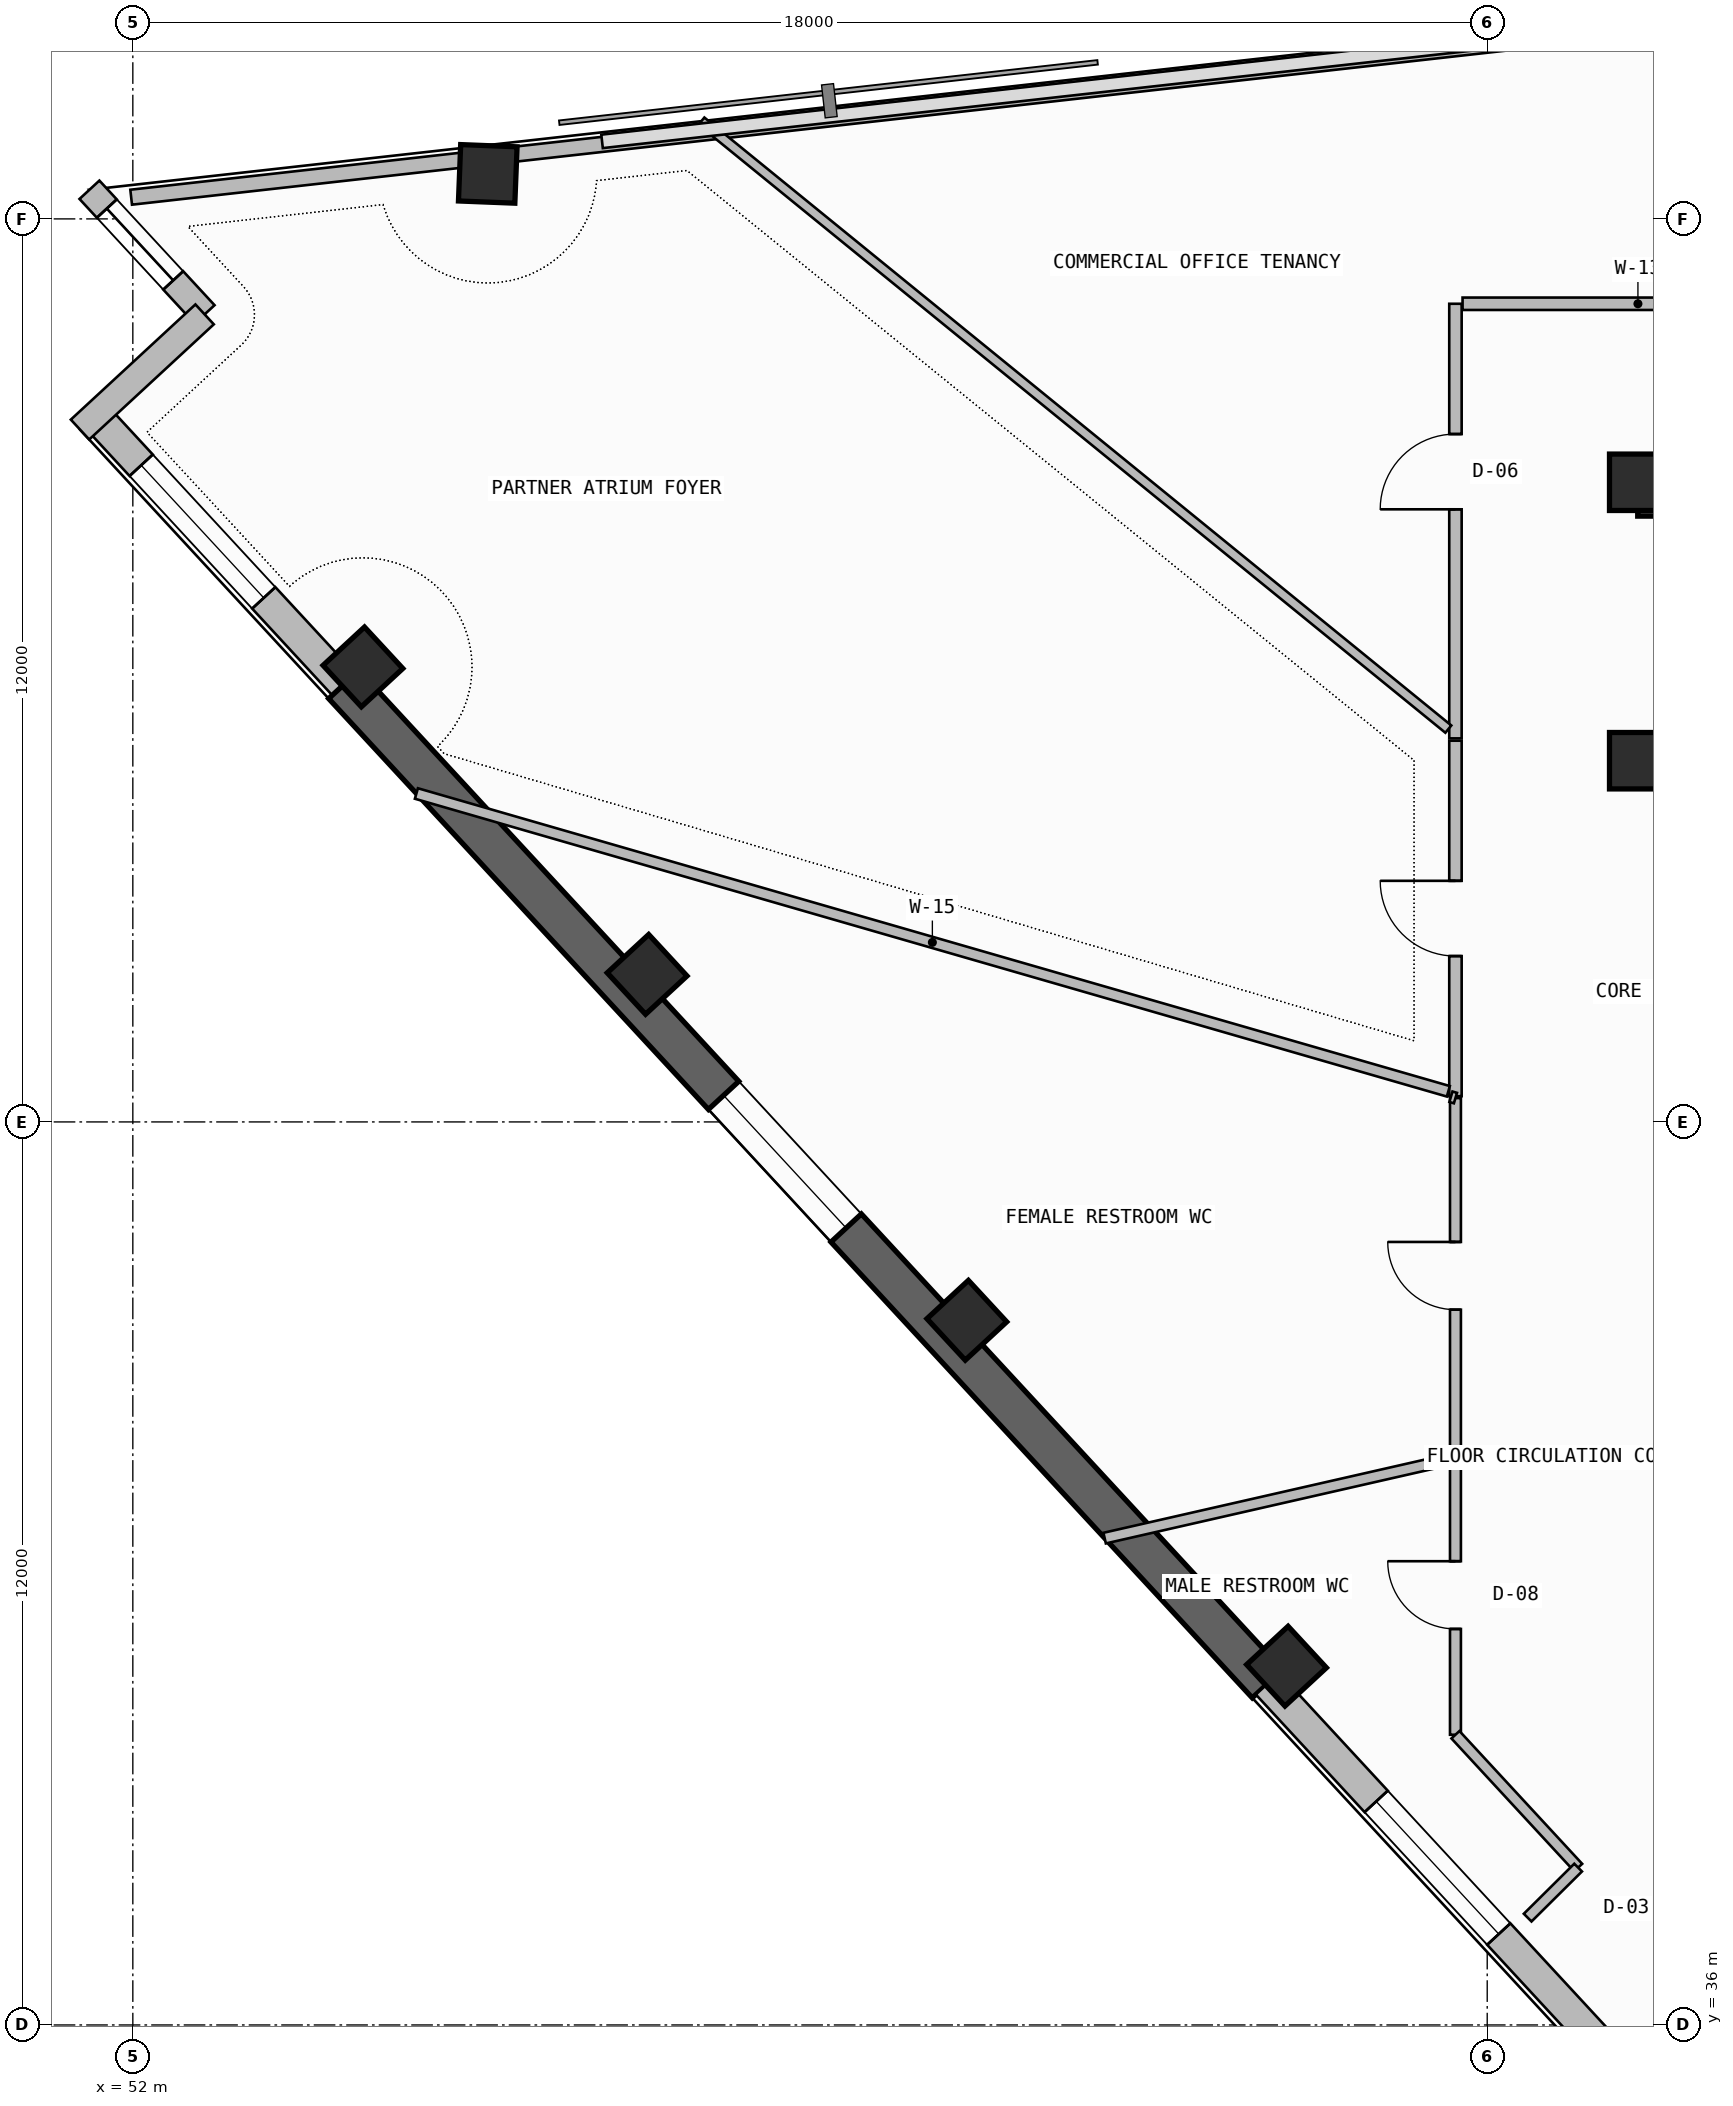
"""IFC4 building model, lengths in metres.
Left out: names, types, materials, properties, quantities, classifications, styles, units other than length and angle.
Written with IfcOpenShell. Run it as: python <this file> out.ifc"""

import sys

from ifc_helpers import new_model, si_unit, direction, frame, frame_2d, origin, origin_2d, place, context, subcontext, project, spatial, rectangle, extrude, element, fill, save


model = new_model("IFC4")
c1 = context("Model", 3, precision=1e-05, world=origin(), true_north=direction((0.0, 1.0)))
c2 = subcontext(c1, "Body", "Model", "MODEL_VIEW")
j1 = project(units=[si_unit("LENGTHUNIT", "METRE"), si_unit("PLANEANGLEUNIT", "RADIAN")], contexts=[c1])
p1 = place(None, origin())
s1 = spatial("IfcSite", under=j1, at=p1, CompositionType="ELEMENT")
p2 = place(p1, origin())
s2 = spatial("IfcBuilding", under=s1, at=p2, CompositionType="ELEMENT")
p3 = place(p2, frame((0.0, 0.0, 281.86)))
s3 = spatial("IfcBuildingStorey", under=s2, at=p3, CompositionType="ELEMENT", Elevation=281.86)
p4 = place(p3, frame((72.0, 56.35, -0.26), z_axis=(0.0, 0.0, 1.0), x_axis=(1.0, 0.0, 0.0)))
e1 = element("IfcWall", 1, at=p4, inside=s3, PredefinedType="SHEAR", context=c2, shape_type="SweptSolid", body=[
    extrude(rectangle(XDim=13.6, YDim=0.6, at=frame_2d((6.8, 0.0))), origin(), (0.0, 0.0, 1.0), 3.52),
])
for number, where, z_axis, x_axis in (
    (2, (72.0, 52.8, 0.0), (0.0, 0.0, 1.0), (1.0, 0.0, 0.0)),
    (3, (72.0, 56.5, 0.0), (0.0, 0.0, 1.0), (1.0, 0.0, 0.0)),
    (4, (56.717, 60.598, 0.0), (0.0, 0.0, 1.0), (0.039, 0.999, 0.0)),
    (5, (55.058, 54.046, 0.0), (0.0, 0.0, 1.0), (-0.679, 0.734, 0.0)),
    (6, (58.835, 49.961, 0.0), (0.0, 0.0, 1.0), (-0.679, 0.734, 0.0)),
    (7, (63.084, 45.364, 0.0), (0.0, 0.0, 1.0), (-0.679, 0.734, 0.0)),
    (8, (67.333, 40.768, 0.0), (0.0, 0.0, 1.0), (-0.679, 0.734, 0.0)),
):
    element("IfcColumn", number, at=place(p3, frame(where, z_axis=z_axis, x_axis=x_axis)), inside=s3, PredefinedType="COLUMN", context=c2, shape_type="SweptSolid", body=[
        extrude(rectangle(XDim=0.75, YDim=0.75, at=origin_2d()), origin(), (0.0, 0.0, 1.0), 3.52),
    ])
p5 = place(p3, frame((51.5, 57.387, 0.0), z_axis=(0.0, 0.0, 1.0), x_axis=(0.67880684669, -0.734316869537, 0.0)))
e9 = element("IfcWall", 9, at=p5, inside=s3, PredefinedType="SOLIDWALL", context=c2, shape_type="SweptSolid", body=[
    extrude(rectangle(XDim=4.869, YDim=0.42, at=frame_2d((2.434, 0.0))), origin(), (0.0, 0.0, 1.0), 2.645),
])
p6 = place(p5, frame((0.9, 0.0, 1.1)))
e10 = element("IfcOpeningElement", 10, at=p6, cuts=e9, PredefinedType="OPENING", context=c2, shape_type="SweptSolid", body=[
    extrude(rectangle(XDim=2.4, YDim=1.2, at=frame_2d((1.2, 0.6))), frame((0.0, 0.22, 0.0), z_axis=(0.0, -1.0, 0.0), x_axis=(1.0, 0.0, 0.0)), (0.0, 0.0, 1.0), 0.44),
])
p7 = place(p3, frame((54.805, 53.812, -0.26), z_axis=(0.0, 0.0, 1.0), x_axis=(0.678803115619, -0.734320318543, 0.0)))
e11 = element("IfcWall", 11, at=p7, inside=s3, PredefinedType="SHEAR", context=c2, shape_type="SweptSolid", body=[
    extrude(rectangle(XDim=18.083, YDim=0.55, at=frame_2d((9.042, 0.0))), origin(), (0.0, 0.0, 1.0), 3.52),
])
p8 = place(p7, frame((7.434, 0.0, 1.1)))
e12 = element("IfcOpeningElement", 12, at=p8, cuts=e11, PredefinedType="OPENING", context=c2, shape_type="SweptSolid", body=[
    extrude(rectangle(XDim=2.4, YDim=1.2, at=frame_2d((1.2, 0.6))), frame((0.0, 0.285, 0.0), z_axis=(0.0, -1.0, 0.0), x_axis=(1.0, 0.0, 0.0)), (0.0, 0.0, 1.0), 0.57),
])
p9 = place(p3, frame((67.08, 40.533, 0.0), z_axis=(0.0, 0.0, 1.0), x_axis=(0.678800006437, -0.734323192648, 0.0)))
e13 = element("IfcWall", 13, at=p9, inside=s3, PredefinedType="SOLIDWALL", context=c2, shape_type="SweptSolid", body=[
    extrude(rectangle(XDim=6.512, YDim=0.42, at=frame_2d((3.256, 0.0))), origin(), (0.0, 0.0, 1.0), 2.645),
])
p10 = place(p9, frame((2.129, 0.0, 1.1)))
e14 = element("IfcOpeningElement", 14, at=p10, cuts=e13, PredefinedType="OPENING", context=c2, shape_type="SweptSolid", body=[
    extrude(rectangle(XDim=2.4, YDim=1.2, at=frame_2d((1.2, 0.6))), frame((0.0, 0.22, 0.0), z_axis=(0.0, -1.0, 0.0), x_axis=(1.0, 0.0, 0.0)), (0.0, 0.0, 1.0), 0.44),
])
p11 = place(p3, frame((51.423, 60.387, 0.0), z_axis=(0.0, 0.0, 1.0), x_axis=(0.678792531533, -0.734330102294, 0.0)))
e15 = element("IfcWall", 15, at=p11, inside=s3, PredefinedType="SOLIDWALL", context=c2, shape_type="SweptSolid", body=[
    extrude(rectangle(XDim=2.255, YDim=0.36, at=frame_2d((1.127, 0.0))), origin(), (0.0, 0.0, 1.0), 3.26),
])
p12 = place(p11, frame((0.34, 0.0, 0.45)))
e16 = element("IfcOpeningElement", 16, at=p12, cuts=e15, PredefinedType="OPENING", context=c2, shape_type="SweptSolid", body=[
    extrude(rectangle(XDim=1.3, YDim=2.4, at=frame_2d((0.65, 1.2))), frame((0.0, 0.19, 0.0), z_axis=(0.0, -1.0, 0.0), x_axis=(1.0, 0.0, 0.0)), (0.0, 0.0, 1.0), 0.38),
])
p13 = place(p3, frame((52.954, 58.731, 0.0), z_axis=(0.0, 0.0, 1.0), x_axis=(-0.734330102294, -0.678792531533, 0.0)))
e17 = element("IfcWall", 17, at=p13, inside=s3, PredefinedType="SOLIDWALL", context=c2, shape_type="SweptSolid", body=[
    extrude(rectangle(XDim=2.255, YDim=0.36, at=frame_2d((1.127, 0.0))), origin(), (0.0, 0.0, 1.0), 3.26),
])
p14 = place(p3, frame((81.557, 63.604, 0.0), z_axis=(0.0, 0.0, 1.0), x_axis=(-0.993776455024, -0.111392806945, 0.0)))
e18 = element("IfcWall", 18, at=p14, inside=s3, PredefinedType="PARAPET", context=c2, shape_type="SweptSolid", body=[
    extrude(rectangle(XDim=24.891, YDim=0.2, at=frame_2d((12.446, 0.0))), origin(), (0.0, 0.0, 1.0), 1.15),
])
p15 = place(p3, frame((56.565, 60.802, 0.0), z_axis=(0.0, 0.0, 1.0), x_axis=(-0.99377164586, -0.111435702918, 0.0)))
e19 = element("IfcWall", 19, at=p15, inside=s3, PredefinedType="PARAPET", context=c2, shape_type="SweptSolid", body=[
    extrude(rectangle(XDim=4.616, YDim=0.2, at=frame_2d((2.308, 0.0))), origin(), (0.0, 0.0, 1.0), 1.15),
])
p16 = place(p3, frame((69.578, 43.569, 0.0), z_axis=(0.0, 0.0, 1.0), x_axis=(0.0, -1.0, 0.0)))
e20 = element("IfcWall", 20, at=p16, inside=s3, PredefinedType="PARTITIONING", context=c2, shape_type="SweptSolid", body=[
    extrude(rectangle(XDim=3.712, YDim=0.145, at=frame_2d((1.856, 0.0))), origin(), (0.0, 0.0, 1.0), 3.26),
])
p17 = place(p16, frame((1.406, 0.0, 0.0)))
e21 = element("IfcOpeningElement", 21, at=p17, cuts=e20, PredefinedType="OPENING", context=c2, shape_type="SweptSolid", body=[
    extrude(rectangle(XDim=0.9, YDim=2.1, at=frame_2d((0.45, 1.05))), frame((0.0, 0.083, 0.0), z_axis=(0.0, -1.0, 0.0), x_axis=(1.0, 0.0, 0.0)), (0.0, 0.0, 1.0), 0.165),
])
p18 = place(p3, frame((69.578, 39.856, 0.0), z_axis=(0.0, 0.0, 1.0), x_axis=(0.678773655608, -0.734347550178, 0.0)))
e22 = element("IfcWall", 22, at=p18, inside=s3, PredefinedType="PARTITIONING", context=c2, shape_type="SweptSolid", body=[
    extrude(rectangle(XDim=2.403, YDim=0.145, at=frame_2d((1.202, 0.0))), origin(), (0.0, 0.0, 1.0), 3.26),
])
p19 = place(p3, frame((64.916, 42.469, 0.0), z_axis=(0.0, 0.0, 1.0), x_axis=(0.975015749861, 0.222135741209, 0.0)))
e23 = element("IfcWall", 23, at=p19, inside=s3, PredefinedType="PARTITIONING", context=c2, shape_type="SweptSolid", body=[
    extrude(rectangle(XDim=4.695, YDim=0.145, at=frame_2d((2.348, 0.0))), origin(), (0.0, 0.0, 1.0), 2.645),
])
p20 = place(p3, frame((69.578, 58.872, 0.0), z_axis=(0.0, 0.0, 1.0), x_axis=(0.0, -1.0, 0.0)))
e24 = element("IfcWall", 24, at=p20, inside=s3, PredefinedType="PARTITIONING", context=c2, shape_type="SweptSolid", body=[
    extrude(rectangle(XDim=5.776, YDim=0.165, at=frame_2d((2.888, 0.0))), origin(), (0.0, 0.0, 1.0), 2.745),
])
p21 = place(p20, frame((1.731, 0.0, 0.0)))
e25 = element("IfcOpeningElement", 25, at=p21, cuts=e24, PredefinedType="OPENING", context=c2, shape_type="SweptSolid", body=[
    extrude(rectangle(XDim=1.0, YDim=2.2, at=frame_2d((0.5, 1.1))), frame((0.0, 0.093, 0.0), z_axis=(0.0, -1.0, 0.0), x_axis=(1.0, 0.0, 0.0)), (0.0, 0.0, 1.0), 0.185),
])
p22 = place(p3, frame((74.333, 58.872, 0.0), z_axis=(0.0, 0.0, 1.0), x_axis=(-1.0, 0.0, 0.0)))
e26 = element("IfcWall", 26, at=p22, inside=s3, PredefinedType="PARTITIONING", context=c2, shape_type="SweptSolid", body=[
    extrude(rectangle(XDim=4.661, YDim=0.165, at=frame_2d((2.331, 0.0))), origin(), (0.0, 0.0, 1.0), 3.26),
])
p23 = place(p3, frame((69.483, 53.22, 0.0), z_axis=(0.0, 0.0, 1.0), x_axis=(-0.775619555182, 0.631200685693, 0.0)))
e27 = element("IfcWall", 27, at=p23, inside=s3, PredefinedType="PARTITIONING", context=c2, shape_type="SweptSolid", body=[
    extrude(rectangle(XDim=12.799, YDim=0.125, at=frame_2d((6.399, 0.0))), origin(), (0.0, 0.0, 1.0), 2.745),
])
p24 = place(p3, frame((69.578, 53.066, 0.0), z_axis=(0.0, 0.0, 1.0), x_axis=(0.0, -1.0, 0.0)))
e28 = element("IfcWall", 28, at=p24, inside=s3, PredefinedType="PARTITIONING", context=c2, shape_type="SweptSolid", body=[
    extrude(rectangle(XDim=4.724, YDim=0.165, at=frame_2d((2.362, 0.0))), origin(), (0.0, 0.0, 1.0), 2.745),
])
p25 = place(p24, frame((1.862, 0.0, 0.0)))
e29 = element("IfcOpeningElement", 29, at=p25, cuts=e28, PredefinedType="OPENING", context=c2, shape_type="SweptSolid", body=[
    extrude(rectangle(XDim=1.0, YDim=2.2, at=frame_2d((0.5, 1.1))), frame((0.0, 0.093, 0.0), z_axis=(0.0, -1.0, 0.0), x_axis=(1.0, 0.0, 0.0)), (0.0, 0.0, 1.0), 0.185),
])
p26 = place(p3, frame((69.483, 48.407, 0.0), z_axis=(0.0, 0.0, 1.0), x_axis=(-0.960799062269, 0.277245670738, 0.0)))
e30 = element("IfcWall", 30, at=p26, inside=s3, PredefinedType="PARTITIONING", context=c2, shape_type="SweptSolid", body=[
    extrude(rectangle(XDim=14.274, YDim=0.145, at=frame_2d((7.137, 0.0))), origin(), (0.0, 0.0, 1.0), 2.645),
])
p27 = place(p3, frame((69.578, 48.317, 0.0), z_axis=(0.0, 0.0, 1.0), x_axis=(0.0, -1.0, 0.0)))
e31 = element("IfcWall", 31, at=p27, inside=s3, PredefinedType="PARTITIONING", context=c2, shape_type="SweptSolid", body=[
    extrude(rectangle(XDim=4.724, YDim=0.145, at=frame_2d((2.362, 0.0))), origin(), (0.0, 0.0, 1.0), 3.26),
])
p28 = place(p27, frame((1.912, 0.0, 0.0)))
e32 = element("IfcOpeningElement", 32, at=p28, cuts=e31, PredefinedType="OPENING", context=c2, shape_type="SweptSolid", body=[
    extrude(rectangle(XDim=0.9, YDim=2.1, at=frame_2d((0.45, 1.05))), frame((0.0, 0.083, 0.0), z_axis=(0.0, -1.0, 0.0), x_axis=(1.0, 0.0, 0.0)), (0.0, 0.0, 1.0), 0.165),
])
p29 = place(p3, frame((69.518, 48.335, 0.0), z_axis=(0.0, 0.0, 1.0), x_axis=(0.95868008586, -0.284486366942, 0.0)))
e33 = element("IfcWall", 33, at=p29, inside=s3, PredefinedType="PARTITIONING", context=c2, shape_type="SweptSolid", body=[
    extrude(rectangle(XDim=0.063, YDim=0.145, at=frame_2d((0.031, 0.0))), origin(), (0.0, 0.0, 1.0), 3.26),
])
p30 = place(p3, frame((69.578, 43.593, 0.0), z_axis=(0.0, 0.0, 1.0), x_axis=(-0.977569195393, -0.210614501446, 0.0)))
e34 = element("IfcWall", 34, at=p30, inside=s3, PredefinedType="PARTITIONING", context=c2, shape_type="SweptSolid", body=[
    extrude(rectangle(XDim=0.062, YDim=0.145, at=frame_2d((0.031, 0.0))), origin(), (0.0, 0.0, 1.0), 3.26),
])
p31 = place(p3, frame((71.208, 38.091, 0.0), z_axis=(0.0, 0.0, 1.0), x_axis=(-0.710073172531, -0.704127892965, 0.0)))
e35 = element("IfcWall", 35, at=p31, inside=s3, PredefinedType="PARTITIONING", context=c2, shape_type="SweptSolid", body=[
    extrude(rectangle(XDim=0.945, YDim=0.145, at=frame_2d((0.472, 0.0))), origin(), (0.0, 0.0, 1.0), 3.26),
])
p32 = place(p6, origin())
e36 = element("IfcWindow", 36, at=p32, inside=s3, PartitioningType="SINGLE_PANEL", PredefinedType="WINDOW", context=c2, shape_type="SweptSolid", body=[
    extrude(rectangle(XDim=2.4, YDim=1.2, at=frame_2d((1.2, 0.6))), frame((0.0, 0.03, 0.0), z_axis=(0.0, -1.0, 0.0), x_axis=(1.0, 0.0, 0.0)), (0.0, 0.0, 1.0), 0.06),
])
fill(e10, e36)
p33 = place(p8, origin())
e37 = element("IfcWindow", 37, at=p33, inside=s3, PartitioningType="SINGLE_PANEL", PredefinedType="WINDOW", context=c2, shape_type="SweptSolid", body=[
    extrude(rectangle(XDim=2.4, YDim=1.2, at=frame_2d((1.2, 0.6))), frame((0.0, 0.03, 0.0), z_axis=(0.0, -1.0, 0.0), x_axis=(1.0, 0.0, 0.0)), (0.0, 0.0, 1.0), 0.06),
])
fill(e12, e37)
p34 = place(p10, origin())
e38 = element("IfcWindow", 38, at=p34, inside=s3, PartitioningType="SINGLE_PANEL", PredefinedType="WINDOW", context=c2, shape_type="SweptSolid", body=[
    extrude(rectangle(XDim=2.4, YDim=1.2, at=frame_2d((1.2, 0.6))), frame((0.0, 0.03, 0.0), z_axis=(0.0, -1.0, 0.0), x_axis=(1.0, 0.0, 0.0)), (0.0, 0.0, 1.0), 0.06),
])
fill(e14, e38)
p35 = place(p12, origin())
e39 = element("IfcWindow", 39, at=p35, inside=s3, PartitioningType="SINGLE_PANEL", PredefinedType="WINDOW", context=c2, shape_type="SweptSolid", body=[
    extrude(rectangle(XDim=1.3, YDim=2.4, at=frame_2d((0.65, 1.2))), frame((0.0, 0.03, 0.0), z_axis=(0.0, -1.0, 0.0), x_axis=(1.0, 0.0, 0.0)), (0.0, 0.0, 1.0), 0.06),
])
fill(e16, e39)
p36 = place(p17, frame((0.9, 0.0, 0.0), z_axis=(0.0, 0.0, 1.0), x_axis=(-1.0, 0.0, 0.0)))
e40 = element("IfcDoor", 40, at=p36, inside=s3, OperationType="SINGLE_SWING_RIGHT", PredefinedType="DOOR", context=c2, shape_type="SweptSolid", body=[
    extrude(rectangle(XDim=0.9, YDim=2.1, at=frame_2d((0.45, 1.05))), frame((0.0, 0.025, 0.0), z_axis=(0.0, -1.0, 0.0), x_axis=(1.0, 0.0, 0.0)), (0.0, 0.0, 1.0), 0.05),
])
fill(e21, e40)
p37 = place(p21, frame((1.0, 0.0, 0.0), z_axis=(0.0, 0.0, 1.0), x_axis=(-1.0, 0.0, 0.0)))
e41 = element("IfcDoor", 41, at=p37, inside=s3, OperationType="SINGLE_SWING_LEFT", PredefinedType="DOOR", context=c2, shape_type="SweptSolid", body=[
    extrude(rectangle(XDim=1.0, YDim=2.2, at=frame_2d((0.5, 1.1))), frame((0.0, 0.025, 0.0), z_axis=(0.0, -1.0, 0.0), x_axis=(1.0, 0.0, 0.0)), (0.0, 0.0, 1.0), 0.05),
])
fill(e25, e41)
p38 = place(p25, frame((1.0, 0.0, 0.0), z_axis=(0.0, 0.0, 1.0), x_axis=(-1.0, 0.0, 0.0)))
e42 = element("IfcDoor", 42, at=p38, inside=s3, OperationType="SINGLE_SWING_RIGHT", PredefinedType="DOOR", context=c2, shape_type="SweptSolid", body=[
    extrude(rectangle(XDim=1.0, YDim=2.2, at=frame_2d((0.5, 1.1))), frame((0.0, 0.025, 0.0), z_axis=(0.0, -1.0, 0.0), x_axis=(1.0, 0.0, 0.0)), (0.0, 0.0, 1.0), 0.05),
])
fill(e29, e42)
p39 = place(p28, frame((0.9, 0.0, 0.0), z_axis=(0.0, 0.0, 1.0), x_axis=(-1.0, 0.0, 0.0)))
e43 = element("IfcDoor", 43, at=p39, inside=s3, OperationType="SINGLE_SWING_RIGHT", PredefinedType="DOOR", context=c2, shape_type="SweptSolid", body=[
    extrude(rectangle(XDim=0.9, YDim=2.1, at=frame_2d((0.45, 1.05))), frame((0.0, 0.025, 0.0), z_axis=(0.0, -1.0, 0.0), x_axis=(1.0, 0.0, 0.0)), (0.0, 0.0, 1.0), 0.05),
])
fill(e32, e43)
save(model, sys.argv[1])
